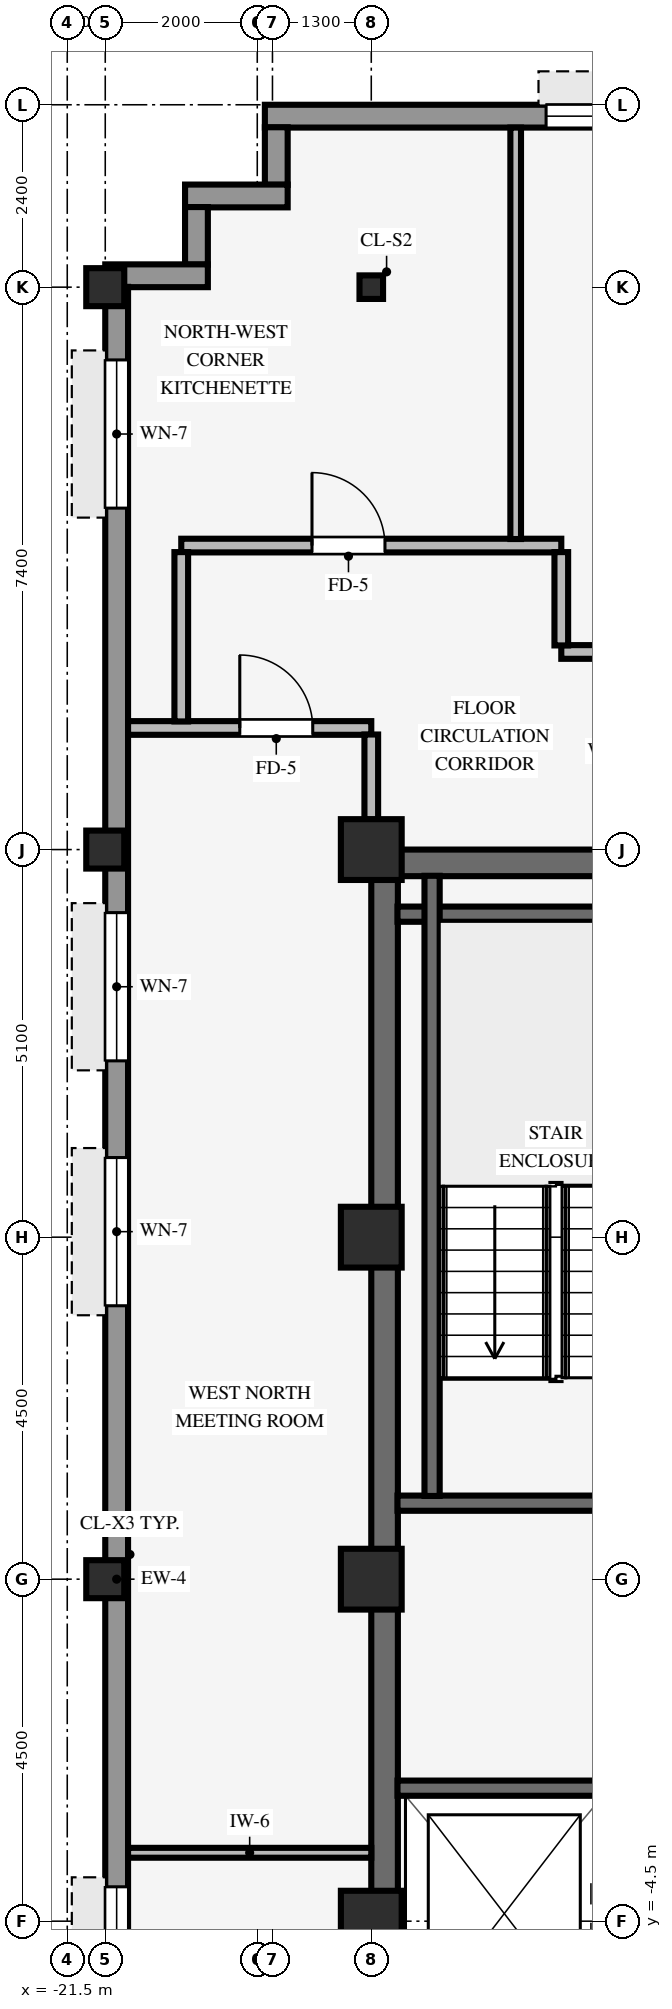
"""IFC4 building model, lengths in metres.
Left out: names, types, materials, properties, quantities, classifications, styles, units other than length and angle.
Written with IfcOpenShell. Run it as: python <this file> out.ifc"""

import sys

from ifc_helpers import new_model, si_unit, direction, frame, frame_2d, origin, origin_2d, place, context, subcontext, project, spatial, rectangle, hollow_rectangle, i_section, extrude, source, transform, mapped, element, fill, save


model = new_model("IFC4")
c1 = context("Model", 3, precision=1e-05, world=origin(), true_north=direction((0.0, 1.0)))
c2 = subcontext(c1, "Body", "Model", "MODEL_VIEW")
j1 = project(units=[si_unit("LENGTHUNIT", "METRE"), si_unit("PLANEANGLEUNIT", "RADIAN")], contexts=[c1])
p1 = place(None, origin())
s1 = spatial("IfcSite", under=j1, at=p1, CompositionType="ELEMENT")
p2 = place(p1, origin())
s2 = spatial("IfcBuilding", under=s1, at=p2, CompositionType="ELEMENT")
p3 = place(p2, frame((0.0, 0.0, 272.55)))
s3 = spatial("IfcBuildingStorey", under=s2, at=p3, CompositionType="ELEMENT", Elevation=272.55)
p4 = place(p3, frame((-17.5, 9.425, 0.0), z_axis=(0.0, 0.0, 1.0), x_axis=(1.0, 0.0, 0.0)))
e1 = element("IfcWall", 1, at=p4, inside=s3, PredefinedType="SHEAR", context=c2, shape_type="SweptSolid", body=[
    extrude(rectangle(XDim=8.5, YDim=0.35, at=frame_2d((4.25, 0.0))), origin(), (0.0, 0.0, 1.0), 3.37),
])
p5 = place(p3, frame((-17.325, -9.255, 0.0), z_axis=(0.0, 0.0, 1.0), x_axis=(0.0, 1.0, 0.0)))
e2 = element("IfcWall", 2, at=p5, inside=s3, PredefinedType="SHEAR", context=c2, shape_type="SweptSolid", body=[
    extrude(rectangle(XDim=18.51, YDim=0.35, at=frame_2d((9.255, 0.0))), origin(), (0.0, 0.0, 1.0), 3.37),
])
for number, where, z_axis, x_axis in (
    (3, (-17.5, -4.5, 0.0), (0.0, 0.0, 1.0), (1.0, 0.0, 0.0)),
    (4, (-17.5, 4.5, 0.0), (0.0, 0.0, 1.0), (1.0, 0.0, 0.0)),
    (5, (-17.5, 9.6, 0.0), (0.0, 0.0, 1.0), (1.0, 0.0, 0.0)),
    (6, (-17.5, 0.0, 0.0), (0.0, 0.0, 1.0), (1.0, 0.0, 0.0)),
):
    element("IfcColumn", number, at=place(p3, frame(where, z_axis=z_axis, x_axis=x_axis)), inside=s3, PredefinedType="COLUMN", context=c2, shape_type="SweptSolid", body=[
        extrude(rectangle(XDim=0.8, YDim=0.8, at=origin_2d()), origin(), (0.0, 0.0, 1.0), 3.37),
    ])
for number, where, z_axis, x_axis in (
    (7, (-21.0, 0.0, 0.0), (0.0, 0.0, 1.0), (1.0, 0.0, 0.0)),
    (8, (-21.0, 9.6, 0.0), (0.0, 0.0, 1.0), (1.0, 0.0, 0.0)),
    (9, (-21.0, 17.0, 0.0), (0.0, 0.0, 1.0), (1.0, 0.0, 0.0)),
):
    element("IfcColumn", number, at=place(p3, frame(where, z_axis=z_axis, x_axis=x_axis)), inside=s3, PredefinedType="COLUMN", context=c2, shape_type="SweptSolid", body=[
        extrude(hollow_rectangle(XDim=0.5, YDim=0.5, WallThickness=0.032, InnerFilletRadius=0.032, OuterFilletRadius=0.064, at=origin_2d()), origin(), (0.0, 0.0, 1.0), 3.37),
    ])
p6 = place(p3, frame((-17.5, 17.0, 0.0), z_axis=(0.0, 0.0, 1.0), x_axis=(1.0, 0.0, 0.0)))
e10 = element("IfcColumn", 10, at=p6, inside=s3, PredefinedType="COLUMN", context=c2, shape_type="SweptSolid", body=[
    extrude(i_section(OverallWidth=0.31, OverallDepth=0.31, WebThickness=0.015, FlangeThickness=0.015, FilletRadius=0.015, at=origin_2d()), origin(), (0.0, 0.0, 1.0), 3.37),
])
p7 = place(p3, frame((-18.9, 19.25, 0.0), z_axis=(0.0, 0.0, 1.0), x_axis=(1.0, 0.0, 0.0)))
e11 = element("IfcWall", 11, at=p7, inside=s3, PredefinedType="STANDARD", context=c2, shape_type="SweptSolid", body=[
    extrude(rectangle(XDim=35.6, YDim=0.3, at=frame_2d((17.8, 0.0))), origin(), (0.0, 0.0, 1.0), 2.705),
])
p8 = place(p7, frame((13.5, 0.0, 0.0)))
e12 = element("IfcOpeningElement", 12, at=p8, cuts=e11, PredefinedType="OPENING", context=c2, shape_type="SweptSolid", body=[
    extrude(rectangle(XDim=1.05, YDim=2.1, at=frame_2d((0.525, 1.05))), frame((0.0, 0.16, 0.0), z_axis=(0.0, -1.0, 0.0), x_axis=(1.0, 0.0, 0.0)), (0.0, 0.0, 1.0), 0.32),
])
p9 = place(p7, frame((3.7, 0.0, 0.8)))
e13 = element("IfcOpeningElement", 13, at=p9, cuts=e11, PredefinedType="OPENING", context=c2, shape_type="SweptSolid", body=[
    extrude(rectangle(XDim=1.2, YDim=1.48, at=frame_2d((0.6, 0.74))), frame((0.0, 0.16, 0.0), z_axis=(0.0, -1.0, 0.0), x_axis=(1.0, 0.0, 0.0)), (0.0, 0.0, 1.0), 0.32),
])
p10 = place(p7, frame((16.75, 0.0, 0.8)))
e14 = element("IfcOpeningElement", 14, at=p10, cuts=e11, PredefinedType="OPENING", context=c2, shape_type="SweptSolid", body=[
    extrude(rectangle(XDim=1.2, YDim=1.48, at=frame_2d((0.6, 0.74))), frame((0.0, 0.16, 0.0), z_axis=(0.0, -1.0, 0.0), x_axis=(1.0, 0.0, 0.0)), (0.0, 0.0, 1.0), 0.32),
])
p11 = place(p7, frame((22.0, 0.0, 0.8)))
e15 = element("IfcOpeningElement", 15, at=p11, cuts=e11, PredefinedType="OPENING", context=c2, shape_type="SweptSolid", body=[
    extrude(rectangle(XDim=1.2, YDim=1.48, at=frame_2d((0.6, 0.74))), frame((0.0, 0.16, 0.0), z_axis=(0.0, -1.0, 0.0), x_axis=(1.0, 0.0, 0.0)), (0.0, 0.0, 1.0), 0.32),
])
p12 = place(p7, frame((25.9, 0.0, 0.8)))
e16 = element("IfcOpeningElement", 16, at=p12, cuts=e11, PredefinedType="OPENING", context=c2, shape_type="SweptSolid", body=[
    extrude(rectangle(XDim=1.2, YDim=1.48, at=frame_2d((0.6, 0.74))), frame((0.0, 0.16, 0.0), z_axis=(0.0, -1.0, 0.0), x_axis=(1.0, 0.0, 0.0)), (0.0, 0.0, 1.0), 0.32),
])
p13 = place(p7, frame((32.05, 0.0, 0.8)))
e17 = element("IfcOpeningElement", 17, at=p13, cuts=e11, PredefinedType="OPENING", context=c2, shape_type="SweptSolid", body=[
    extrude(rectangle(XDim=1.2, YDim=1.48, at=frame_2d((0.6, 0.74))), frame((0.0, 0.16, 0.0), z_axis=(0.0, -1.0, 0.0), x_axis=(1.0, 0.0, 0.0)), (0.0, 0.0, 1.0), 0.32),
])
p14 = place(p3, frame((-18.75, 18.346, 0.0), z_axis=(0.0, 0.0, 1.0), x_axis=(0.0, 1.0, 0.0)))
e18 = element("IfcWall", 18, at=p14, inside=s3, PredefinedType="STANDARD", context=c2, shape_type="SweptSolid", body=[
    extrude(rectangle(XDim=0.758, YDim=0.3, at=frame_2d((0.379, 0.0))), origin(), (0.0, 0.0, 1.0), 2.892),
])
p15 = place(p3, frame((-19.95, 18.2, 0.0), z_axis=(0.0, 0.0, 1.0), x_axis=(1.0, 0.0, 0.0)))
e19 = element("IfcWall", 19, at=p15, inside=s3, PredefinedType="STANDARD", context=c2, shape_type="SweptSolid", body=[
    extrude(rectangle(XDim=1.35, YDim=0.3, at=frame_2d((0.675, 0.0))), origin(), (0.0, 0.0, 1.0), 2.892),
])
p16 = place(p3, frame((-19.8, 17.296, 0.0), z_axis=(0.0, 0.0, 1.0), x_axis=(0.0, 1.0, 0.0)))
e20 = element("IfcWall", 20, at=p16, inside=s3, PredefinedType="STANDARD", context=c2, shape_type="SweptSolid", body=[
    extrude(rectangle(XDim=0.758, YDim=0.3, at=frame_2d((0.379, 0.0))), origin(), (0.0, 0.0, 1.0), 2.892),
])
p17 = place(p3, frame((-21.0, 17.15, 0.0), z_axis=(0.0, 0.0, 1.0), x_axis=(1.0, 0.0, 0.0)))
e21 = element("IfcWall", 21, at=p17, inside=s3, PredefinedType="STANDARD", context=c2, shape_type="SweptSolid", body=[
    extrude(rectangle(XDim=1.35, YDim=0.3, at=frame_2d((0.675, 0.0))), origin(), (0.0, 0.0, 1.0), 2.892),
])
p18 = place(p3, frame((-20.85, -17.004, 0.0), z_axis=(0.0, 0.0, 1.0), x_axis=(0.0, 1.0, 0.0)))
e22 = element("IfcWall", 22, at=p18, inside=s3, PredefinedType="STANDARD", context=c2, shape_type="SweptSolid", body=[
    extrude(rectangle(XDim=34.008, YDim=0.3, at=frame_2d((17.004, 0.0))), origin(), (0.0, 0.0, 1.0), 2.705),
])
p19 = place(p18, frame((0.961, 0.0, 0.8)))
e23 = element("IfcOpeningElement", 23, at=p19, cuts=e22, PredefinedType="OPENING", context=c2, shape_type="SweptSolid", body=[
    extrude(rectangle(XDim=1.95, YDim=1.48, at=frame_2d((0.975, 0.74))), frame((0.0, 0.16, 0.0), z_axis=(0.0, -1.0, 0.0), x_axis=(1.0, 0.0, 0.0)), (0.0, 0.0, 1.0), 0.32),
])
p20 = place(p18, frame((8.234, 0.0, 0.8)))
e24 = element("IfcOpeningElement", 24, at=p20, cuts=e22, PredefinedType="OPENING", context=c2, shape_type="SweptSolid", body=[
    extrude(rectangle(XDim=1.95, YDim=1.48, at=frame_2d((0.975, 0.74))), frame((0.0, 0.16, 0.0), z_axis=(0.0, -1.0, 0.0), x_axis=(1.0, 0.0, 0.0)), (0.0, 0.0, 1.0), 0.32),
])
p21 = place(p18, frame((11.006, 0.0, 0.8)))
e25 = element("IfcOpeningElement", 25, at=p21, cuts=e22, PredefinedType="OPENING", context=c2, shape_type="SweptSolid", body=[
    extrude(rectangle(XDim=1.95, YDim=1.48, at=frame_2d((0.975, 0.74))), frame((0.0, 0.16, 0.0), z_axis=(0.0, -1.0, 0.0), x_axis=(1.0, 0.0, 0.0)), (0.0, 0.0, 1.0), 0.32),
])
p22 = place(p18, frame((20.602, 0.0, 0.8)))
e26 = element("IfcOpeningElement", 26, at=p22, cuts=e22, PredefinedType="OPENING", context=c2, shape_type="SweptSolid", body=[
    extrude(rectangle(XDim=1.95, YDim=1.48, at=frame_2d((0.975, 0.74))), frame((0.0, 0.16, 0.0), z_axis=(0.0, -1.0, 0.0), x_axis=(1.0, 0.0, 0.0)), (0.0, 0.0, 1.0), 0.32),
])
p23 = place(p18, frame((23.824, 0.0, 0.8)))
e27 = element("IfcOpeningElement", 27, at=p23, cuts=e22, PredefinedType="OPENING", context=c2, shape_type="SweptSolid", body=[
    extrude(rectangle(XDim=1.95, YDim=1.48, at=frame_2d((0.975, 0.74))), frame((0.0, 0.16, 0.0), z_axis=(0.0, -1.0, 0.0), x_axis=(1.0, 0.0, 0.0)), (0.0, 0.0, 1.0), 0.32),
])
p24 = place(p18, frame((31.097, 0.0, 0.8)))
e28 = element("IfcOpeningElement", 28, at=p24, cuts=e22, PredefinedType="OPENING", context=c2, shape_type="SweptSolid", body=[
    extrude(rectangle(XDim=1.95, YDim=1.48, at=frame_2d((0.975, 0.74))), frame((0.0, 0.16, 0.0), z_axis=(0.0, -1.0, 0.0), x_axis=(1.0, 0.0, 0.0)), (0.0, 0.0, 1.0), 0.32),
])
for number, where, z_axis, x_axis in (
    (29, (-17.155, 1.0, 0.0), (0.0, 0.0, 1.0), (1.0, 0.0, 0.0)),
    (30, (-17.155, 8.75, 0.0), (0.0, 0.0, 1.0), (1.0, 0.0, 0.0)),
):
    element("IfcWall", number, at=place(p3, frame(where, z_axis=z_axis, x_axis=x_axis)), inside=s3, PredefinedType="SHEAR", context=c2, shape_type="SweptSolid", body=[
        extrude(rectangle(XDim=3.62, YDim=0.2, at=frame_2d((1.81, 0.0))), origin(), (0.0, 0.0, 1.0), 3.37),
    ])
p25 = place(p3, frame((-16.7, 1.095, 0.0), z_axis=(0.0, 0.0, 1.0), x_axis=(0.0, 1.0, 0.0)))
e31 = element("IfcWall", 31, at=p25, inside=s3, PredefinedType="SHEAR", context=c2, shape_type="SweptSolid", body=[
    extrude(rectangle(XDim=8.16, YDim=0.2, at=frame_2d((4.08, 0.0))), origin(), (0.0, 0.0, 1.0), 3.37),
])
p26 = place(p3, frame((-17.155, -2.75, 0.0), z_axis=(0.0, 0.0, 1.0), x_axis=(1.0, 0.0, 0.0)))
e32 = element("IfcWall", 32, at=p26, inside=s3, PredefinedType="SHEAR", context=c2, shape_type="SweptSolid", body=[
    extrude(rectangle(XDim=2.71, YDim=0.2, at=frame_2d((1.355, 0.0))), origin(), (0.0, 0.0, 1.0), 3.37),
])
p27 = place(p3, frame((-20.7, -3.6, 0.0), z_axis=(0.0, 0.0, 1.0), x_axis=(1.0, 0.0, 0.0)))
e33 = element("IfcWall", 33, at=p27, inside=s3, PredefinedType="PARTITIONING", context=c2, shape_type="SweptSolid", body=[
    extrude(rectangle(XDim=3.2, YDim=0.13, at=frame_2d((1.6, 0.0))), origin(), (0.0, 0.0, 1.0), 3.36),
])
p28 = place(p3, frame((-20.7, 11.2, 0.0), z_axis=(0.0, 0.0, 1.0), x_axis=(1.0, 0.0, 0.0)))
e34 = element("IfcWall", 34, at=p28, inside=s3, PredefinedType="PARTITIONING", context=c2, shape_type="SweptSolid", body=[
    extrude(rectangle(XDim=3.2, YDim=0.18, at=frame_2d((1.6, 0.0))), origin(), (0.0, 0.0, 1.0), 3.36),
])
p29 = place(p28, frame((1.47, 0.0, 0.0)))
e35 = element("IfcOpeningElement", 35, at=p29, cuts=e34, PredefinedType="OPENING", context=c2, shape_type="SweptSolid", body=[
    extrude(rectangle(XDim=0.96, YDim=2.1, at=frame_2d((0.48, 1.05))), frame((0.0, 0.1, 0.0), z_axis=(0.0, -1.0, 0.0), x_axis=(1.0, 0.0, 0.0)), (0.0, 0.0, 1.0), 0.2),
])
p30 = place(p3, frame((-15.0, 12.2, 0.0), z_axis=(0.0, 0.0, 1.0), x_axis=(1.0, 0.0, 0.0)))
e36 = element("IfcWall", 36, at=p30, inside=s3, PredefinedType="PARTITIONING", context=c2, shape_type="SweptSolid", body=[
    extrude(rectangle(XDim=30.8, YDim=0.18, at=frame_2d((15.4, 0.0))), origin(), (0.0, 0.0, 1.0), 3.36),
])
p31 = place(p30, frame((1.42, 0.0, 0.0)))
e37 = element("IfcOpeningElement", 37, at=p31, cuts=e36, PredefinedType="OPENING", context=c2, shape_type="SweptSolid", body=[
    extrude(rectangle(XDim=0.96, YDim=2.1, at=frame_2d((0.48, 1.05))), frame((0.0, 0.1, 0.0), z_axis=(0.0, -1.0, 0.0), x_axis=(1.0, 0.0, 0.0)), (0.0, 0.0, 1.0), 0.2),
])
p32 = place(p30, frame((25.42, 0.0, 0.0)))
e38 = element("IfcOpeningElement", 38, at=p32, cuts=e36, PredefinedType="OPENING", context=c2, shape_type="SweptSolid", body=[
    extrude(rectangle(XDim=0.96, YDim=2.1, at=frame_2d((0.48, 1.05))), frame((0.0, 0.1, 0.0), z_axis=(0.0, -1.0, 0.0), x_axis=(1.0, 0.0, 0.0)), (0.0, 0.0, 1.0), 0.2),
])
p33 = place(p30, frame((19.22, 0.0, 0.0)))
e39 = element("IfcOpeningElement", 39, at=p33, cuts=e36, PredefinedType="OPENING", context=c2, shape_type="SweptSolid", body=[
    extrude(rectangle(XDim=0.96, YDim=2.1, at=frame_2d((0.48, 1.05))), frame((0.0, 0.1, 0.0), z_axis=(0.0, -1.0, 0.0), x_axis=(1.0, 0.0, 0.0)), (0.0, 0.0, 1.0), 0.2),
])
p34 = place(p30, frame((28.82, 0.0, 0.0)))
e40 = element("IfcOpeningElement", 40, at=p34, cuts=e36, PredefinedType="OPENING", context=c2, shape_type="SweptSolid", body=[
    extrude(rectangle(XDim=0.96, YDim=2.1, at=frame_2d((0.48, 1.05))), frame((0.0, 0.1, 0.0), z_axis=(0.0, -1.0, 0.0), x_axis=(1.0, 0.0, 0.0)), (0.0, 0.0, 1.0), 0.2),
])
p35 = place(p30, frame((9.35, 0.0, 0.0)))
e41 = element("IfcOpeningElement", 41, at=p35, cuts=e36, PredefinedType="OPENING", context=c2, shape_type="SweptSolid", body=[
    extrude(rectangle(XDim=0.9, YDim=2.1, at=frame_2d((0.45, 1.05))), frame((0.0, 0.1, 0.0), z_axis=(0.0, -1.0, 0.0), x_axis=(1.0, 0.0, 0.0)), (0.0, 0.0, 1.0), 0.2),
])
p36 = place(p30, frame((12.15, 0.0, 0.0)))
e42 = element("IfcOpeningElement", 42, at=p36, cuts=e36, PredefinedType="OPENING", context=c2, shape_type="SweptSolid", body=[
    extrude(rectangle(XDim=0.9, YDim=2.1, at=frame_2d((0.45, 1.05))), frame((0.0, 0.1, 0.0), z_axis=(0.0, -1.0, 0.0), x_axis=(1.0, 0.0, 0.0)), (0.0, 0.0, 1.0), 0.2),
])
p37 = place(p30, frame((6.72, 0.0, 0.0)))
e43 = element("IfcOpeningElement", 43, at=p37, cuts=e36, PredefinedType="OPENING", context=c2, shape_type="SweptSolid", body=[
    extrude(rectangle(XDim=0.96, YDim=2.1, at=frame_2d((0.48, 1.05))), frame((0.0, 0.1, 0.0), z_axis=(0.0, -1.0, 0.0), x_axis=(1.0, 0.0, 0.0)), (0.0, 0.0, 1.0), 0.2),
])
p38 = place(p30, frame((16.25, 0.0, 0.0)))
e44 = element("IfcOpeningElement", 44, at=p38, cuts=e36, PredefinedType="OPENING", context=c2, shape_type="SweptSolid", body=[
    extrude(rectangle(XDim=0.9, YDim=2.1, at=frame_2d((0.45, 1.05))), frame((0.0, 0.1, 0.0), z_axis=(0.0, -1.0, 0.0), x_axis=(1.0, 0.0, 0.0)), (0.0, 0.0, 1.0), 0.2),
])
p39 = place(p3, frame((-20.0, 13.6, 0.0), z_axis=(0.0, 0.0, 1.0), x_axis=(1.0, 0.0, 0.0)))
e45 = element("IfcWall", 45, at=p39, inside=s3, PredefinedType="PARTITIONING", context=c2, shape_type="SweptSolid", body=[
    extrude(rectangle(XDim=5.0, YDim=0.18, at=frame_2d((2.5, 0.0))), origin(), (0.0, 0.0, 1.0), 3.038),
])
p40 = place(p39, frame((1.72, 0.0, 0.0)))
e46 = element("IfcOpeningElement", 46, at=p40, cuts=e45, PredefinedType="OPENING", context=c2, shape_type="SweptSolid", body=[
    extrude(rectangle(XDim=0.96, YDim=2.1, at=frame_2d((0.48, 1.05))), frame((0.0, 0.1, 0.0), z_axis=(0.0, -1.0, 0.0), x_axis=(1.0, 0.0, 0.0)), (0.0, 0.0, 1.0), 0.2),
])
p41 = place(p3, frame((-20.0, 11.286, 0.0), z_axis=(0.0, 0.0, 1.0), x_axis=(0.0, 1.0, 0.0)))
e47 = element("IfcWall", 47, at=p41, inside=s3, PredefinedType="PARTITIONING", context=c2, shape_type="SweptSolid", body=[
    extrude(rectangle(XDim=2.228, YDim=0.18, at=frame_2d((1.114, 0.0))), origin(), (0.0, 0.0, 1.0), 3.36),
])
p42 = place(p3, frame((-17.5, 9.996, 0.0), z_axis=(0.0, 0.0, 1.0), x_axis=(0.0, 1.0, 0.0)))
e48 = element("IfcWall", 48, at=p42, inside=s3, PredefinedType="PARTITIONING", context=c2, shape_type="SweptSolid", body=[
    extrude(rectangle(XDim=1.118, YDim=0.18, at=frame_2d((0.559, 0.0))), origin(), (0.0, 0.0, 1.0), 2.892),
])
p43 = place(p3, frame((-15.6, 13.686, 0.0), z_axis=(0.0, 0.0, 1.0), x_axis=(0.0, 1.0, 0.0)))
e49 = element("IfcWall", 49, at=p43, inside=s3, PredefinedType="PARTITIONING", context=c2, shape_type="SweptSolid", body=[
    extrude(rectangle(XDim=5.414, YDim=0.14, at=frame_2d((2.707, 0.0))), origin(), (0.0, 0.0, 1.0), 3.36),
])
p44 = place(p3, frame((-15.0, 12.286, 0.0), z_axis=(0.0, 0.0, 1.0), x_axis=(0.0, 1.0, 0.0)))
e50 = element("IfcWall", 50, at=p44, inside=s3, PredefinedType="PARTITIONING", context=c2, shape_type="SweptSolid", body=[
    extrude(rectangle(XDim=1.228, YDim=0.18, at=frame_2d((0.614, 0.0))), origin(), (0.0, 0.0, 1.0), 3.36),
])
m1 = source(origin(), c2, "Body", "SweptSolid", [
    extrude(rectangle(XDim=1.2, YDim=1.48, at=frame_2d((0.6, 0.74))), frame((0.0, 0.03, 0.0), z_axis=(0.0, -1.0, 0.0), x_axis=(1.0, 0.0, 0.0)), (0.0, 0.0, 1.0), 0.06),
])
p45 = place(p9, origin())
e51 = element("IfcWindow", 51, at=p45, inside=s3, PartitioningType="SINGLE_PANEL", PredefinedType="WINDOW", context=c2, shape_type="MappedRepresentation", body=[
    mapped(m1, transform((0.0, 0.0, 0.0), scale=1.0)),
])
fill(e13, e51)
m2 = source(origin(), c2, "Body", "SweptSolid", [
    extrude(rectangle(XDim=1.95, YDim=1.48, at=frame_2d((0.975, 0.74))), frame((0.0, 0.03, 0.0), z_axis=(0.0, -1.0, 0.0), x_axis=(1.0, 0.0, 0.0)), (0.0, 0.0, 1.0), 0.06),
])
p46 = place(p21, origin())
e52 = element("IfcWindow", 52, at=p46, inside=s3, PartitioningType="SINGLE_PANEL", PredefinedType="WINDOW", context=c2, shape_type="MappedRepresentation", body=[
    mapped(m2, transform((0.0, 0.0, 0.0), scale=1.0)),
])
fill(e25, e52)
p47 = place(p22, origin())
e53 = element("IfcWindow", 53, at=p47, inside=s3, PartitioningType="SINGLE_PANEL", PredefinedType="WINDOW", context=c2, shape_type="MappedRepresentation", body=[
    mapped(m2, transform((0.0, 0.0, 0.0), scale=1.0)),
])
fill(e26, e53)
p48 = place(p23, origin())
e54 = element("IfcWindow", 54, at=p48, inside=s3, PartitioningType="SINGLE_PANEL", PredefinedType="WINDOW", context=c2, shape_type="MappedRepresentation", body=[
    mapped(m2, transform((0.0, 0.0, 0.0), scale=1.0)),
])
fill(e27, e54)
p49 = place(p24, origin())
e55 = element("IfcWindow", 55, at=p49, inside=s3, PartitioningType="SINGLE_PANEL", PredefinedType="WINDOW", context=c2, shape_type="MappedRepresentation", body=[
    mapped(m2, transform((0.0, 0.0, 0.0), scale=1.0)),
])
fill(e28, e55)
m3 = source(origin(), c2, "Body", "SweptSolid", [
    extrude(rectangle(XDim=0.96, YDim=2.1, at=frame_2d((0.48, 1.05))), frame((0.0, 0.025, 0.0), z_axis=(0.0, -1.0, 0.0), x_axis=(1.0, 0.0, 0.0)), (0.0, 0.0, 1.0), 0.05),
])
p50 = place(p40, origin())
e56 = element("IfcDoor", 56, at=p50, inside=s3, OperationType="SINGLE_SWING_LEFT", PredefinedType="DOOR", context=c2, shape_type="MappedRepresentation", body=[
    mapped(m3, transform((0.0, 0.0, 0.0), scale=1.0)),
])
fill(e46, e56)
p51 = place(p29, origin())
e57 = element("IfcDoor", 57, at=p51, inside=s3, OperationType="SINGLE_SWING_LEFT", PredefinedType="DOOR", context=c2, shape_type="MappedRepresentation", body=[
    mapped(m3, transform((0.0, 0.0, 0.0), scale=1.0)),
])
fill(e35, e57)
save(model, sys.argv[1])
